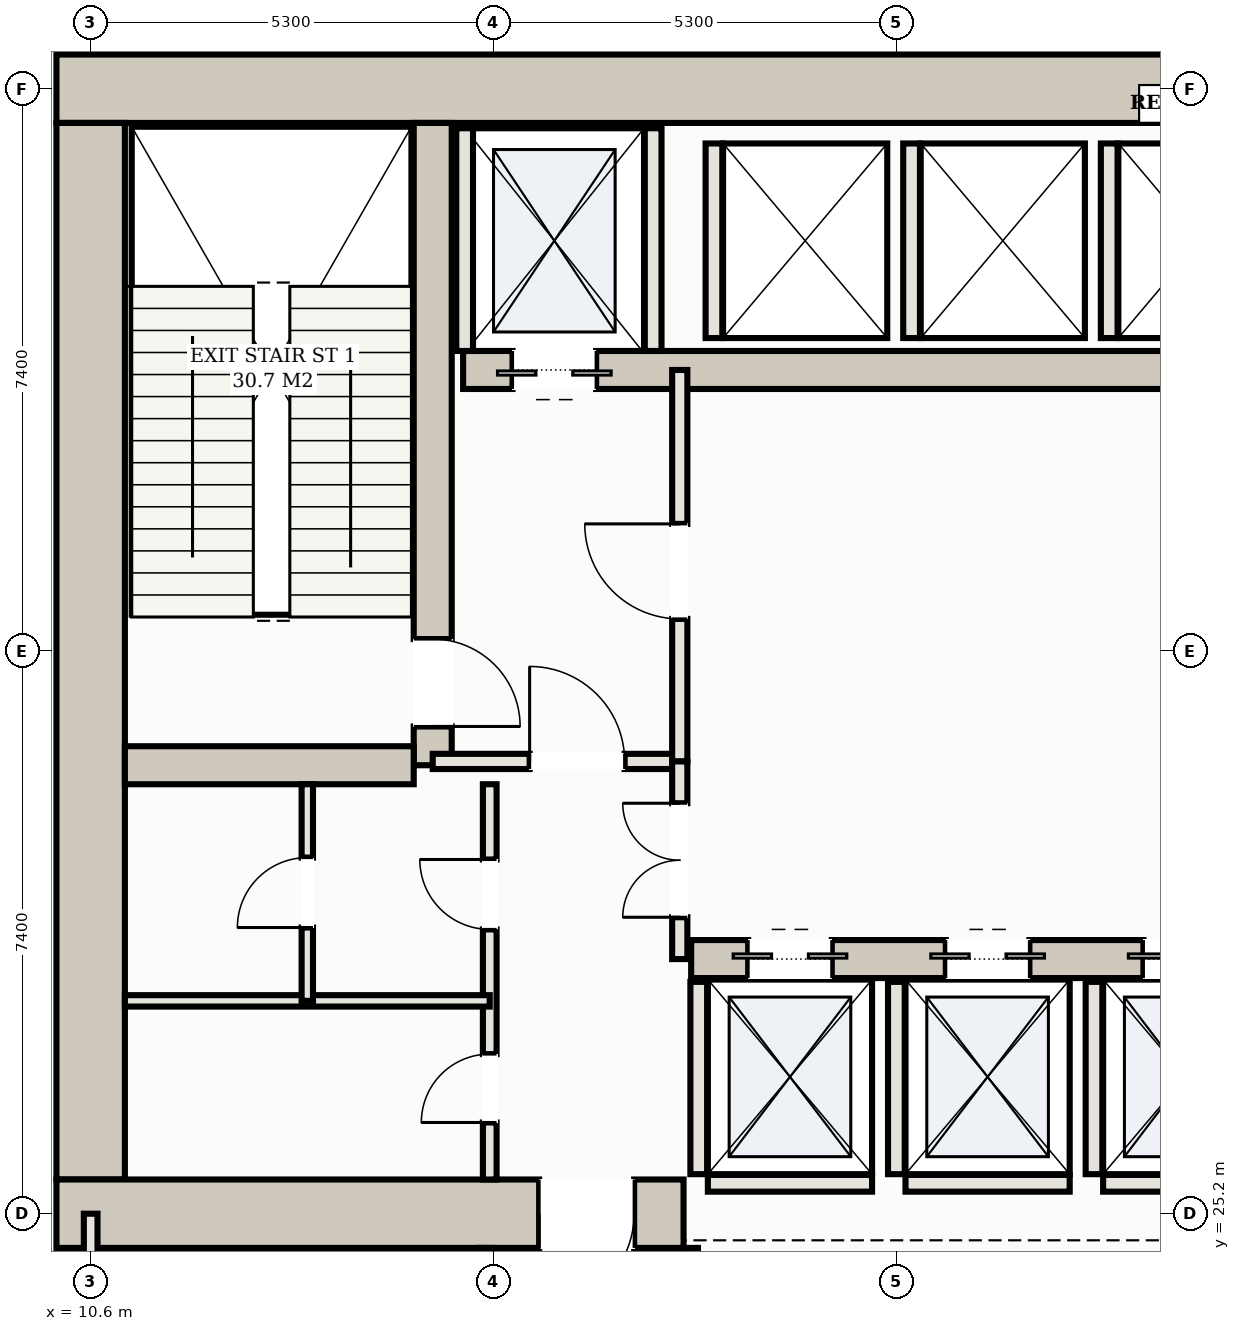
"""IFC4 building model, lengths in metres.
Left out: names, types, materials, properties, quantities, classifications, styles, units other than length and angle.
Written with IfcOpenShell. Run it as: python <this file> out.ifc"""

import sys

from ifc_helpers import new_model, si_unit, direction, frame, frame_2d, origin, place, context, subcontext, project, spatial, rectangle, extrude, element, fill, save


model = new_model("IFC4")
c1 = context("Model", 3, precision=1e-05, world=origin(), true_north=direction((0.0, 1.0)))
c2 = subcontext(c1, "Body", "Model", "MODEL_VIEW")
j1 = project(units=[si_unit("LENGTHUNIT", "METRE"), si_unit("PLANEANGLEUNIT", "RADIAN")], contexts=[c1])
p1 = place(None, origin())
s1 = spatial("IfcSite", under=j1, at=p1, CompositionType="ELEMENT")
p2 = place(p1, origin())
s2 = spatial("IfcBuilding", under=s1, at=p2, CompositionType="ELEMENT")
p3 = place(p2, frame((0.0, 0.0, 19.0)))
s3 = spatial("IfcBuildingStorey", under=s2, at=p3, CompositionType="ELEMENT", Elevation=19.0)
p4 = place(p3, frame((10.15, 40.0, 0.0), z_axis=(0.0, 0.0, 1.0), x_axis=(1.0, 0.0, 0.0)))
e1 = element("IfcWall", 1, at=p4, inside=s3, PredefinedType="SHEAR", context=c2, shape_type="SweptSolid", body=[
    extrude(rectangle(XDim=32.7, YDim=0.9, at=frame_2d((16.35, 0.0))), origin(), (0.0, 0.0, 1.0), 4.86),
])
p5 = place(p3, frame((10.6, 25.65, 0.0), z_axis=(0.0, 0.0, 1.0), x_axis=(0.0, 1.0, 0.0)))
e2 = element("IfcWall", 2, at=p5, inside=s3, PredefinedType="SHEAR", context=c2, shape_type="SweptSolid", body=[
    extrude(rectangle(XDim=13.9, YDim=0.9, at=frame_2d((6.95, 0.0))), origin(), (0.0, 0.0, 1.0), 4.86),
])
p6 = place(p3, frame((10.15, 25.2, 0.0), z_axis=(0.0, 0.0, 1.0), x_axis=(1.0, 0.0, 0.0)))
e3 = element("IfcWall", 3, at=p6, inside=s3, PredefinedType="SHEAR", context=c2, shape_type="SweptSolid", body=[
    extrude(rectangle(XDim=8.25, YDim=0.9, at=frame_2d((4.125, 0.0))), origin(), (0.0, 0.0, 1.0), 4.86),
])
p7 = place(p6, frame((6.35, 0.0, 0.0)))
e4 = element("IfcOpeningElement", 4, at=p7, cuts=e3, PredefinedType="OPENING", context=c2, shape_type="SweptSolid", body=[
    extrude(rectangle(XDim=1.25, YDim=2.2, at=frame_2d((0.625, 1.1))), frame((0.0, 0.46, 0.0), z_axis=(0.0, -1.0, 0.0), x_axis=(1.0, 0.0, 0.0)), (0.0, 0.0, 1.0), 0.92),
])
p8 = place(p3, frame((15.1, 31.1, 0.0), z_axis=(0.0, 0.0, 1.0), x_axis=(0.0, 1.0, 0.0)))
e5 = element("IfcWall", 5, at=p8, inside=s3, PredefinedType="SHEAR", context=c2, shape_type="SweptSolid", body=[
    extrude(rectangle(XDim=8.45, YDim=0.5, at=frame_2d((4.225, 0.0))), origin(), (0.0, 0.0, 1.0), 4.86),
])
p9 = place(p8, frame((0.51, 0.0, 0.0)))
e6 = element("IfcOpeningElement", 6, at=p9, cuts=e5, PredefinedType="OPENING", context=c2, shape_type="SweptSolid", body=[
    extrude(rectangle(XDim=1.15, YDim=2.2, at=frame_2d((0.575, 1.1))), frame((0.0, 0.26, 0.0), z_axis=(0.0, -1.0, 0.0), x_axis=(1.0, 0.0, 0.0)), (0.0, 0.0, 1.0), 0.52),
])
p10 = place(p3, frame((11.05, 31.1, 0.0), z_axis=(0.0, 0.0, 1.0), x_axis=(1.0, 0.0, 0.0)))
e7 = element("IfcWall", 7, at=p10, inside=s3, PredefinedType="SHEAR", context=c2, shape_type="SweptSolid", body=[
    extrude(rectangle(XDim=3.8, YDim=0.5, at=frame_2d((1.9, 0.0))), origin(), (0.0, 0.0, 1.0), 4.86),
])
p11 = place(p3, frame((15.5, 36.3, 0.0), z_axis=(0.0, 0.0, 1.0), x_axis=(1.0, 0.0, 0.0)))
e8 = element("IfcWall", 8, at=p11, inside=s3, PredefinedType="SHEAR", context=c2, shape_type="SweptSolid", body=[
    extrude(rectangle(XDim=22.0, YDim=0.5, at=frame_2d((11.0, 0.0))), origin(), (0.0, 0.0, 1.0), 4.86),
])
p12 = place(p11, frame((0.65, 0.0, 0.0)))
e9 = element("IfcOpeningElement", 9, at=p12, cuts=e8, PredefinedType="OPENING", context=c2, shape_type="SweptSolid", body=[
    extrude(rectangle(XDim=1.1, YDim=2.15, at=frame_2d((0.55, 1.075))), frame((0.0, 0.26, 0.0), z_axis=(0.0, -1.0, 0.0), x_axis=(1.0, 0.0, 0.0)), (0.0, 0.0, 1.0), 0.52),
])
p13 = place(p11, frame((20.25, 0.0, 0.0)))
e10 = element("IfcOpeningElement", 10, at=p13, cuts=e8, PredefinedType="OPENING", context=c2, shape_type="SweptSolid", body=[
    extrude(rectangle(XDim=1.1, YDim=2.15, at=frame_2d((0.55, 1.075))), frame((0.0, 0.26, 0.0), z_axis=(0.0, -1.0, 0.0), x_axis=(1.0, 0.0, 0.0)), (0.0, 0.0, 1.0), 0.52),
])
p14 = place(p11, frame((17.05, 0.0, 0.0)))
e11 = element("IfcOpeningElement", 11, at=p14, cuts=e8, PredefinedType="OPENING", context=c2, shape_type="SweptSolid", body=[
    extrude(rectangle(XDim=1.3, YDim=2.2, at=frame_2d((0.65, 1.1))), frame((0.0, 0.26, 0.0), z_axis=(0.0, -1.0, 0.0), x_axis=(1.0, 0.0, 0.0)), (0.0, 0.0, 1.0), 0.52),
])
p15 = place(p3, frame((18.5, 28.55, 0.0), z_axis=(0.0, 0.0, 1.0), x_axis=(1.0, 0.0, 0.0)))
e12 = element("IfcWall", 12, at=p15, inside=s3, PredefinedType="SHEAR", context=c2, shape_type="SweptSolid", body=[
    extrude(rectangle(XDim=16.0, YDim=0.5, at=frame_2d((8.0, 0.0))), origin(), (0.0, 0.0, 1.0), 4.86),
])
p16 = place(p15, frame((0.75, 0.0, 0.0)))
e13 = element("IfcOpeningElement", 13, at=p16, cuts=e12, PredefinedType="OPENING", context=c2, shape_type="SweptSolid", body=[
    extrude(rectangle(XDim=1.1, YDim=2.15, at=frame_2d((0.55, 1.075))), frame((0.0, 0.26, 0.0), z_axis=(0.0, -1.0, 0.0), x_axis=(1.0, 0.0, 0.0)), (0.0, 0.0, 1.0), 0.52),
])
p17 = place(p15, frame((3.35, 0.0, 0.0)))
e14 = element("IfcOpeningElement", 14, at=p17, cuts=e12, PredefinedType="OPENING", context=c2, shape_type="SweptSolid", body=[
    extrude(rectangle(XDim=1.1, YDim=2.15, at=frame_2d((0.55, 1.075))), frame((0.0, 0.26, 0.0), z_axis=(0.0, -1.0, 0.0), x_axis=(1.0, 0.0, 0.0)), (0.0, 0.0, 1.0), 0.52),
])
p18 = place(p15, frame((5.95, 0.0, 0.0)))
e15 = element("IfcOpeningElement", 15, at=p18, cuts=e12, PredefinedType="OPENING", context=c2, shape_type="SweptSolid", body=[
    extrude(rectangle(XDim=1.1, YDim=2.15, at=frame_2d((0.55, 1.075))), frame((0.0, 0.26, 0.0), z_axis=(0.0, -1.0, 0.0), x_axis=(1.0, 0.0, 0.0)), (0.0, 0.0, 1.0), 0.52),
])
for number, where, z_axis, x_axis in (
    (16, (15.52, 36.55, 0.0), (0.0, 0.0, 1.0), (0.0, 1.0, 0.0)),
    (17, (18.0, 36.55, 0.0), (0.0, 0.0, 1.0), (0.0, 1.0, 0.0)),
):
    element("IfcWall", number, at=place(p3, frame(where, z_axis=z_axis, x_axis=x_axis)), inside=s3, PredefinedType="SOLIDWALL", context=c2, shape_type="SweptSolid", body=[
        extrude(rectangle(XDim=2.93, YDim=0.22, at=frame_2d((1.465, 0.0))), origin(), (0.0, 0.0, 1.0), 4.86),
    ])
p19 = place(p3, frame((18.6, 25.72, 0.0), z_axis=(0.0, 0.0, 1.0), x_axis=(0.0, 1.0, 0.0)))
e18 = element("IfcWall", 18, at=p19, inside=s3, PredefinedType="SOLIDWALL", context=c2, shape_type="SweptSolid", body=[
    extrude(rectangle(XDim=2.53, YDim=0.22, at=frame_2d((1.265, 0.0))), origin(), (0.0, 0.0, 1.0), 4.86),
])
p20 = place(p3, frame((18.72, 25.6, 0.0), z_axis=(0.0, 0.0, 1.0), x_axis=(1.0, 0.0, 0.0)))
e19 = element("IfcWall", 19, at=p20, inside=s3, PredefinedType="SOLIDWALL", context=c2, shape_type="SweptSolid", body=[
    extrude(rectangle(XDim=2.16, YDim=0.22, at=frame_2d((1.08, 0.0))), origin(), (0.0, 0.0, 1.0), 4.86),
])
p21 = place(p3, frame((21.2, 25.72, 0.0), z_axis=(0.0, 0.0, 1.0), x_axis=(0.0, 1.0, 0.0)))
e20 = element("IfcWall", 20, at=p21, inside=s3, PredefinedType="SOLIDWALL", context=c2, shape_type="SweptSolid", body=[
    extrude(rectangle(XDim=2.53, YDim=0.22, at=frame_2d((1.265, 0.0))), origin(), (0.0, 0.0, 1.0), 4.86),
])
p22 = place(p3, frame((21.32, 25.6, 0.0), z_axis=(0.0, 0.0, 1.0), x_axis=(1.0, 0.0, 0.0)))
e21 = element("IfcWall", 21, at=p22, inside=s3, PredefinedType="SOLIDWALL", context=c2, shape_type="SweptSolid", body=[
    extrude(rectangle(XDim=2.16, YDim=0.22, at=frame_2d((1.08, 0.0))), origin(), (0.0, 0.0, 1.0), 4.86),
])
p23 = place(p3, frame((23.8, 25.72, 0.0), z_axis=(0.0, 0.0, 1.0), x_axis=(0.0, 1.0, 0.0)))
e22 = element("IfcWall", 22, at=p23, inside=s3, PredefinedType="SOLIDWALL", context=c2, shape_type="SweptSolid", body=[
    extrude(rectangle(XDim=2.53, YDim=0.22, at=frame_2d((1.265, 0.0))), origin(), (0.0, 0.0, 1.0), 4.86),
])
p24 = place(p3, frame((23.92, 25.6, 0.0), z_axis=(0.0, 0.0, 1.0), x_axis=(1.0, 0.0, 0.0)))
e23 = element("IfcWall", 23, at=p24, inside=s3, PredefinedType="SOLIDWALL", context=c2, shape_type="SweptSolid", body=[
    extrude(rectangle(XDim=2.16, YDim=0.22, at=frame_2d((1.08, 0.0))), origin(), (0.0, 0.0, 1.0), 4.86),
])
for number, where, z_axis, x_axis in (
    (24, (18.8, 36.72, 0.0), (0.0, 0.0, 1.0), (0.0, 1.0, 0.0)),
    (25, (21.4, 36.72, 0.0), (0.0, 0.0, 1.0), (0.0, 1.0, 0.0)),
    (26, (24.0, 36.72, 0.0), (0.0, 0.0, 1.0), (0.0, 1.0, 0.0)),
):
    element("IfcWall", number, at=place(p3, frame(where, z_axis=z_axis, x_axis=x_axis)), inside=s3, PredefinedType="SOLIDWALL", context=c2, shape_type="SweptSolid", body=[
        extrude(rectangle(XDim=2.56, YDim=0.22, at=frame_2d((1.28, 0.0))), origin(), (0.0, 0.0, 1.0), 4.86),
    ])
p25 = place(p3, frame((15.1, 31.15, 0.0), z_axis=(0.0, 0.0, 1.0), x_axis=(1.0, 0.0, 0.0)))
e27 = element("IfcWall", 27, at=p25, inside=s3, PredefinedType="PARTITIONING", context=c2, shape_type="SweptSolid", body=[
    extrude(rectangle(XDim=3.25, YDim=0.2, at=frame_2d((1.625, 0.0))), origin(), (0.0, 0.0, 1.0), 4.86),
])
p26 = place(p25, frame((1.275, 0.0, 0.0)))
e28 = element("IfcOpeningElement", 28, at=p26, cuts=e27, PredefinedType="OPENING", context=c2, shape_type="SweptSolid", body=[
    extrude(rectangle(XDim=1.25, YDim=2.2, at=frame_2d((0.625, 1.1))), frame((0.0, 0.11, 0.0), z_axis=(0.0, -1.0, 0.0), x_axis=(1.0, 0.0, 0.0)), (0.0, 0.0, 1.0), 0.22),
])
p27 = place(p3, frame((18.35, 31.15, 0.0), z_axis=(0.0, 0.0, 1.0), x_axis=(0.0, 1.0, 0.0)))
e29 = element("IfcWall", 29, at=p27, inside=s3, PredefinedType="PARTITIONING", context=c2, shape_type="SweptSolid", body=[
    extrude(rectangle(XDim=5.15, YDim=0.2, at=frame_2d((2.575, 0.0))), origin(), (0.0, 0.0, 1.0), 4.86),
])
p28 = place(p27, frame((1.875, 0.0, 0.0)))
e30 = element("IfcOpeningElement", 30, at=p28, cuts=e29, PredefinedType="OPENING", context=c2, shape_type="SweptSolid", body=[
    extrude(rectangle(XDim=1.25, YDim=2.2, at=frame_2d((0.625, 1.1))), frame((0.0, 0.11, 0.0), z_axis=(0.0, -1.0, 0.0), x_axis=(1.0, 0.0, 0.0)), (0.0, 0.0, 1.0), 0.22),
])
p29 = place(p3, frame((15.85, 25.65, 0.0), z_axis=(0.0, 0.0, 1.0), x_axis=(0.0, 1.0, 0.0)))
e31 = element("IfcWall", 31, at=p29, inside=s3, PredefinedType="PARTITIONING", context=c2, shape_type="SweptSolid", body=[
    extrude(rectangle(XDim=5.2, YDim=0.18, at=frame_2d((2.6, 0.0))), origin(), (0.0, 0.0, 1.0), 3.055),
])
p30 = place(p29, frame((0.75, 0.0, 0.0)))
e32 = element("IfcOpeningElement", 32, at=p30, cuts=e31, PredefinedType="OPENING", context=c2, shape_type="SweptSolid", body=[
    extrude(rectangle(XDim=0.9, YDim=2.15, at=frame_2d((0.45, 1.075))), frame((0.0, 0.1, 0.0), z_axis=(0.0, -1.0, 0.0), x_axis=(1.0, 0.0, 0.0)), (0.0, 0.0, 1.0), 0.2),
])
p31 = place(p29, frame((3.29, 0.0, 0.0)))
e33 = element("IfcOpeningElement", 33, at=p31, cuts=e31, PredefinedType="OPENING", context=c2, shape_type="SweptSolid", body=[
    extrude(rectangle(XDim=0.92, YDim=2.15, at=frame_2d((0.46, 1.075))), frame((0.0, 0.1, 0.0), z_axis=(0.0, -1.0, 0.0), x_axis=(1.0, 0.0, 0.0)), (0.0, 0.0, 1.0), 0.2),
])
p32 = place(p3, frame((11.05, 28.0, 0.0), z_axis=(0.0, 0.0, 1.0), x_axis=(1.0, 0.0, 0.0)))
e34 = element("IfcWall", 34, at=p32, inside=s3, PredefinedType="PARTITIONING", context=c2, shape_type="SweptSolid", body=[
    extrude(rectangle(XDim=4.8, YDim=0.15, at=frame_2d((2.4, 0.0))), origin(), (0.0, 0.0, 1.0), 4.86),
])
p33 = place(p3, frame((13.45, 28.0, 0.0), z_axis=(0.0, 0.0, 1.0), x_axis=(0.0, 1.0, 0.0)))
e35 = element("IfcWall", 35, at=p33, inside=s3, PredefinedType="PARTITIONING", context=c2, shape_type="SweptSolid", body=[
    extrude(rectangle(XDim=2.85, YDim=0.15, at=frame_2d((1.425, 0.0))), origin(), (0.0, 0.0, 1.0), 4.86),
])
p34 = place(p33, frame((0.965, 0.0, 0.0)))
e36 = element("IfcOpeningElement", 36, at=p34, cuts=e35, PredefinedType="OPENING", context=c2, shape_type="SweptSolid", body=[
    extrude(rectangle(XDim=0.92, YDim=2.15, at=frame_2d((0.46, 1.075))), frame((0.0, 0.085, 0.0), z_axis=(0.0, -1.0, 0.0), x_axis=(1.0, 0.0, 0.0)), (0.0, 0.0, 1.0), 0.17),
])
p35 = place(p3, frame((18.35, 28.55, 0.0), z_axis=(0.0, 0.0, 1.0), x_axis=(0.0, 1.0, 0.0)))
e37 = element("IfcWall", 37, at=p35, inside=s3, PredefinedType="PARTITIONING", context=c2, shape_type="SweptSolid", body=[
    extrude(rectangle(XDim=2.6, YDim=0.2, at=frame_2d((1.3, 0.0))), origin(), (0.0, 0.0, 1.0), 4.86),
])
p36 = place(p35, frame((0.55, 0.0, 0.0)))
e38 = element("IfcOpeningElement", 38, at=p36, cuts=e37, PredefinedType="OPENING", context=c2, shape_type="SweptSolid", body=[
    extrude(rectangle(XDim=1.5, YDim=2.25, at=frame_2d((0.75, 1.125))), frame((0.0, 0.11, 0.0), z_axis=(0.0, -1.0, 0.0), x_axis=(1.0, 0.0, 0.0)), (0.0, 0.0, 1.0), 0.22),
])
p37 = place(p3, frame((10.6, 16.2, 0.0), z_axis=(0.0, 0.0, 1.0), x_axis=(0.0, 1.0, 0.0)))
e39 = element("IfcWall", 39, at=p37, inside=s3, PredefinedType="PARTITIONING", context=c2, shape_type="SweptSolid", body=[
    extrude(rectangle(XDim=9.0, YDim=0.18, at=frame_2d((4.5, 0.0))), origin(), (0.0, 0.0, 1.0), 3.055),
])
p38 = place(p3, frame((15.8, 16.2, 0.0), z_axis=(0.0, 0.0, 1.0), x_axis=(0.0, 1.0, 0.0)))
e40 = element("IfcWall", 40, at=p38, inside=s3, PredefinedType="PARTITIONING", context=c2, shape_type="SweptSolid", body=[
    extrude(rectangle(XDim=8.55, YDim=0.18, at=frame_2d((4.275, 0.0))), origin(), (0.0, 0.0, 1.0), 3.055),
])
p39 = place(p3, frame((18.5, 16.2, 0.0), z_axis=(0.0, 0.0, 1.0), x_axis=(0.0, 1.0, 0.0)))
e41 = element("IfcWall", 41, at=p39, inside=s3, PredefinedType="PARTITIONING", context=c2, shape_type="SweptSolid", body=[
    extrude(rectangle(XDim=8.55, YDim=0.18, at=frame_2d((4.275, 0.0))), origin(), (0.0, 0.0, 1.0), 4.86),
])
p40 = place(p12, frame((1.1, 0.0, 0.0), z_axis=(0.0, 0.0, 1.0), x_axis=(-1.0, 0.0, 0.0)))
e42 = element("IfcDoor", 42, at=p40, inside=s3, OperationType="DOUBLE_DOOR_SLIDING", PredefinedType="DOOR", context=c2, shape_type="SweptSolid", body=[
    extrude(rectangle(XDim=1.1, YDim=2.15, at=frame_2d((0.55, 1.075))), frame((0.0, 0.025, 0.0), z_axis=(0.0, -1.0, 0.0), x_axis=(1.0, 0.0, 0.0)), (0.0, 0.0, 1.0), 0.05),
])
fill(e9, e42)
p41 = place(p16, origin())
e43 = element("IfcDoor", 43, at=p41, inside=s3, OperationType="DOUBLE_DOOR_SLIDING", PredefinedType="DOOR", context=c2, shape_type="SweptSolid", body=[
    extrude(rectangle(XDim=1.1, YDim=2.15, at=frame_2d((0.55, 1.075))), frame((0.0, 0.025, 0.0), z_axis=(0.0, -1.0, 0.0), x_axis=(1.0, 0.0, 0.0)), (0.0, 0.0, 1.0), 0.05),
])
fill(e13, e43)
p42 = place(p17, origin())
e44 = element("IfcDoor", 44, at=p42, inside=s3, OperationType="DOUBLE_DOOR_SLIDING", PredefinedType="DOOR", context=c2, shape_type="SweptSolid", body=[
    extrude(rectangle(XDim=1.1, YDim=2.15, at=frame_2d((0.55, 1.075))), frame((0.0, 0.025, 0.0), z_axis=(0.0, -1.0, 0.0), x_axis=(1.0, 0.0, 0.0)), (0.0, 0.0, 1.0), 0.05),
])
fill(e14, e44)
p43 = place(p18, origin())
e45 = element("IfcDoor", 45, at=p43, inside=s3, OperationType="DOUBLE_DOOR_SLIDING", PredefinedType="DOOR", context=c2, shape_type="SweptSolid", body=[
    extrude(rectangle(XDim=1.1, YDim=2.15, at=frame_2d((0.55, 1.075))), frame((0.0, 0.025, 0.0), z_axis=(0.0, -1.0, 0.0), x_axis=(1.0, 0.0, 0.0)), (0.0, 0.0, 1.0), 0.05),
])
fill(e15, e45)
p44 = place(p7, frame((1.25, 0.0, 0.0), z_axis=(0.0, 0.0, 1.0), x_axis=(-1.0, 0.0, 0.0)))
e46 = element("IfcDoor", 46, at=p44, inside=s3, OperationType="SINGLE_SWING_RIGHT", PredefinedType="DOOR", context=c2, shape_type="SweptSolid", body=[
    extrude(rectangle(XDim=1.25, YDim=2.2, at=frame_2d((0.625, 1.1))), frame((0.0, 0.025, 0.0), z_axis=(0.0, -1.0, 0.0), x_axis=(1.0, 0.0, 0.0)), (0.0, 0.0, 1.0), 0.05),
])
fill(e4, e46)
p45 = place(p26, origin())
e47 = element("IfcDoor", 47, at=p45, inside=s3, OperationType="SINGLE_SWING_LEFT", PredefinedType="DOOR", context=c2, shape_type="SweptSolid", body=[
    extrude(rectangle(XDim=1.25, YDim=2.2, at=frame_2d((0.625, 1.1))), frame((0.0, 0.025, 0.0), z_axis=(0.0, -1.0, 0.0), x_axis=(1.0, 0.0, 0.0)), (0.0, 0.0, 1.0), 0.05),
])
fill(e28, e47)
p46 = place(p28, origin())
e48 = element("IfcDoor", 48, at=p46, inside=s3, OperationType="SINGLE_SWING_RIGHT", PredefinedType="DOOR", context=c2, shape_type="SweptSolid", body=[
    extrude(rectangle(XDim=1.25, YDim=2.2, at=frame_2d((0.625, 1.1))), frame((0.0, 0.025, 0.0), z_axis=(0.0, -1.0, 0.0), x_axis=(1.0, 0.0, 0.0)), (0.0, 0.0, 1.0), 0.05),
])
fill(e30, e48)
p47 = place(p9, frame((1.15, 0.0, 0.0), z_axis=(0.0, 0.0, 1.0), x_axis=(-1.0, 0.0, 0.0)))
e49 = element("IfcDoor", 49, at=p47, inside=s3, OperationType="SINGLE_SWING_RIGHT", PredefinedType="DOOR", context=c2, shape_type="SweptSolid", body=[
    extrude(rectangle(XDim=1.15, YDim=2.2, at=frame_2d((0.575, 1.1))), frame((0.0, 0.025, 0.0), z_axis=(0.0, -1.0, 0.0), x_axis=(1.0, 0.0, 0.0)), (0.0, 0.0, 1.0), 0.05),
])
fill(e6, e49)
p48 = place(p30, origin())
e50 = element("IfcDoor", 50, at=p48, inside=s3, OperationType="SINGLE_SWING_LEFT", PredefinedType="DOOR", context=c2, shape_type="SweptSolid", body=[
    extrude(rectangle(XDim=0.9, YDim=2.15, at=frame_2d((0.45, 1.075))), frame((0.0, 0.025, 0.0), z_axis=(0.0, -1.0, 0.0), x_axis=(1.0, 0.0, 0.0)), (0.0, 0.0, 1.0), 0.05),
])
fill(e32, e50)
p49 = place(p31, origin())
e51 = element("IfcDoor", 51, at=p49, inside=s3, OperationType="SINGLE_SWING_RIGHT", PredefinedType="DOOR", context=c2, shape_type="SweptSolid", body=[
    extrude(rectangle(XDim=0.92, YDim=2.15, at=frame_2d((0.46, 1.075))), frame((0.0, 0.025, 0.0), z_axis=(0.0, -1.0, 0.0), x_axis=(1.0, 0.0, 0.0)), (0.0, 0.0, 1.0), 0.05),
])
fill(e33, e51)
p50 = place(p34, origin())
e52 = element("IfcDoor", 52, at=p50, inside=s3, OperationType="SINGLE_SWING_LEFT", PredefinedType="DOOR", context=c2, shape_type="SweptSolid", body=[
    extrude(rectangle(XDim=0.92, YDim=2.15, at=frame_2d((0.46, 1.075))), frame((0.0, 0.025, 0.0), z_axis=(0.0, -1.0, 0.0), x_axis=(1.0, 0.0, 0.0)), (0.0, 0.0, 1.0), 0.05),
])
fill(e36, e52)
p51 = place(p36, origin())
e53 = element("IfcDoor", 53, at=p51, inside=s3, OperationType="DOUBLE_DOOR_SINGLE_SWING", PredefinedType="DOOR", context=c2, shape_type="SweptSolid", body=[
    extrude(rectangle(XDim=1.5, YDim=2.25, at=frame_2d((0.75, 1.125))), frame((0.0, 0.025, 0.0), z_axis=(0.0, -1.0, 0.0), x_axis=(1.0, 0.0, 0.0)), (0.0, 0.0, 1.0), 0.05),
])
fill(e38, e53)
save(model, sys.argv[1])
